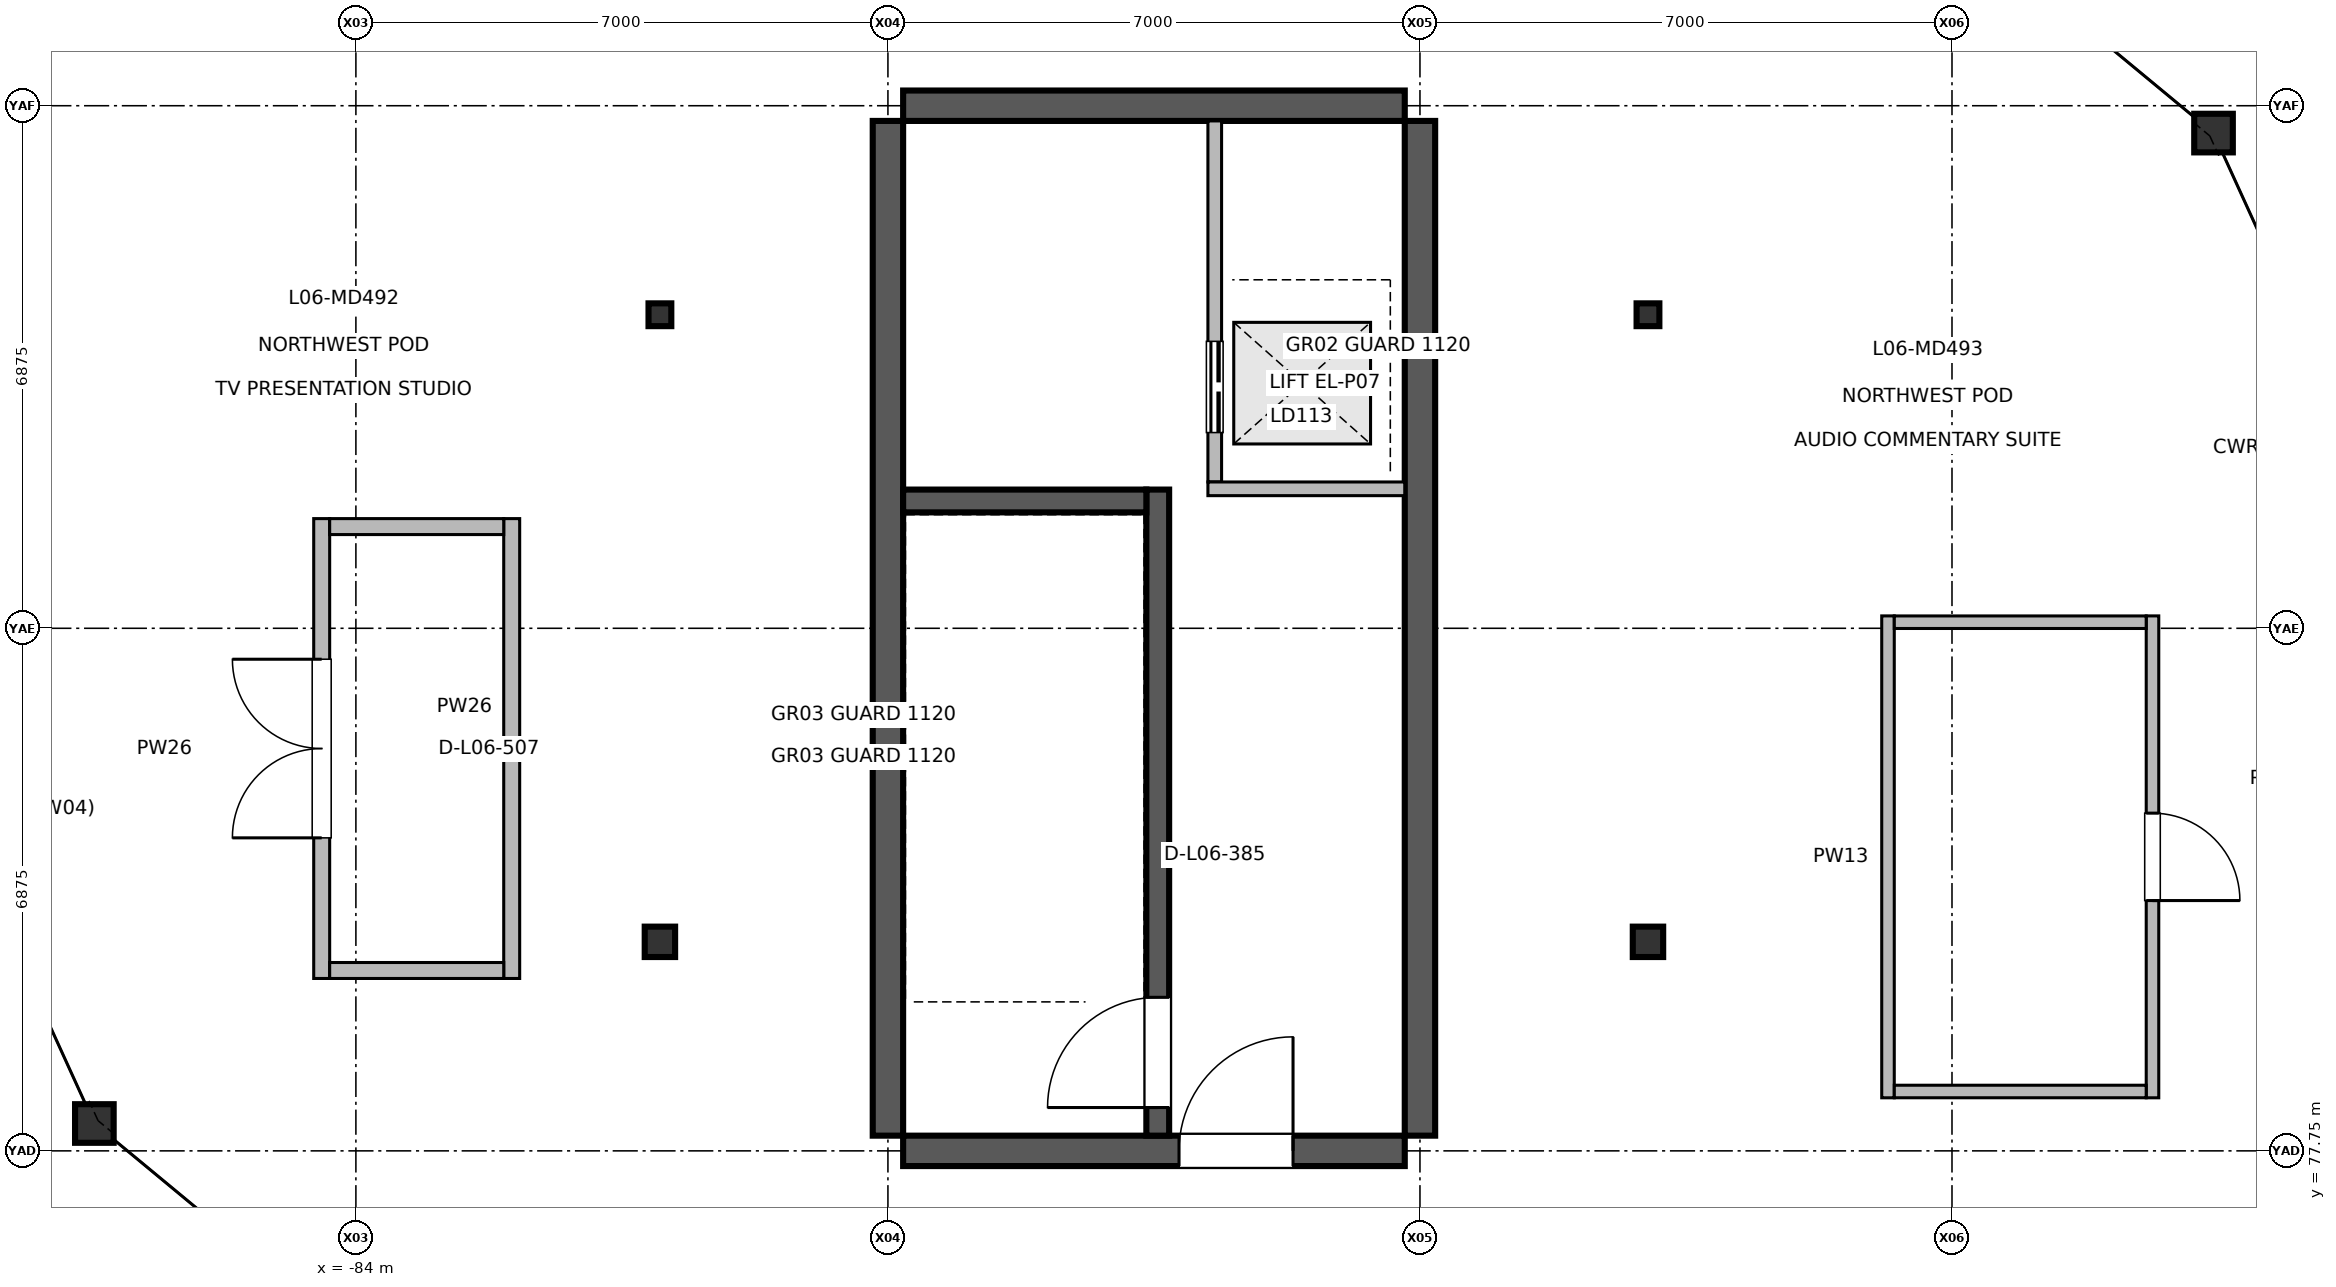
"""IFC4 building model, lengths in metres.
Left out: names, types, materials, properties, quantities, classifications, styles, units other than length and angle.
Written with IfcOpenShell. Run it as: python <this file> out.ifc"""

import sys

from ifc_helpers import new_model, si_unit, direction, frame, frame_2d, origin, origin_2d, place, context, subcontext, project, spatial, rectangle, hollow_circle, i_section, extrude, element, fill, save


model = new_model("IFC4")
c1 = context("Model", 3, precision=1e-05, world=origin(), true_north=direction((0.0, 1.0)))
c2 = subcontext(c1, "Body", "Model", "MODEL_VIEW")
j1 = project(units=[si_unit("LENGTHUNIT", "METRE"), si_unit("PLANEANGLEUNIT", "RADIAN")], contexts=[c1])
p1 = place(None, origin())
s1 = spatial("IfcSite", under=j1, at=p1, CompositionType="ELEMENT")
p2 = place(p1, origin())
s2 = spatial("IfcBuilding", under=s1, at=p2, CompositionType="ELEMENT")
p3 = place(p2, frame((0.0, 0.0, 26.4)))
s3 = spatial("IfcBuildingStorey", under=s2, at=p3, CompositionType="ELEMENT", Elevation=26.4)
for number, where, z_axis, x_axis in (
    (1, (-80.0, 80.5, 0.0), (0.0, 0.0, 1.0), (1.0, 0.0, 0.0)),
    (2, (-67.0, 80.5, 0.0), (0.0, 0.0, 1.0), (1.0, 0.0, 0.0)),
):
    element("IfcColumn", number, at=place(p3, frame(where, z_axis=z_axis, x_axis=x_axis)), inside=s3, PredefinedType="COLUMN", context=c2, shape_type="SweptSolid", body=[
        extrude(i_section(OverallWidth=0.4, OverallDepth=0.4, WebThickness=0.013, FlangeThickness=0.021, at=origin_2d()), origin(), (0.0, 0.0, 1.0), 4.945),
    ])
for number, where, z_axis, x_axis in (
    (3, (-80.0, 88.75, 0.0), (0.0, 0.0, 1.0), (1.0, 0.0, 0.0)),
    (4, (-67.0, 88.75, 0.0), (0.0, 0.0, 1.0), (1.0, 0.0, 0.0)),
):
    element("IfcColumn", number, at=place(p3, frame(where, z_axis=z_axis, x_axis=x_axis)), inside=s3, PredefinedType="COLUMN", context=c2, shape_type="SweptSolid", body=[
        extrude(i_section(OverallWidth=0.3, OverallDepth=0.3, WebThickness=0.01, FlangeThickness=0.015, at=origin_2d()), origin(), (0.0, 0.0, 1.0), 4.945),
    ])
for number, where, z_axis, x_axis in (
    (5, (-59.559, 91.14, 0.0), (0.0, 0.0, 1.0), (1.0, 0.0, 0.0)),
    (6, (-87.441, 78.11, 0.0), (0.0, 0.0, 1.0), (1.0, 0.0, 0.0)),
):
    element("IfcColumn", number, at=place(p3, frame(where, z_axis=z_axis, x_axis=x_axis)), inside=s3, PredefinedType="COLUMN", context=c2, shape_type="SweptSolid", body=[
        extrude(hollow_circle(Radius=0.254, WallThickness=0.025, at=origin_2d()), origin(), (0.0, 0.0, 1.0), 4.945),
    ])
for number, where, z_axis, x_axis in (
    (7, (-77.0, 77.95, 0.0), (0.0, 0.0, 1.0), (0.0, 1.0, 0.0)),
    (8, (-70.0, 77.95, 0.0), (0.0, 0.0, 1.0), (0.0, 1.0, 0.0)),
):
    element("IfcWall", number, at=place(p3, frame(where, z_axis=z_axis, x_axis=x_axis)), inside=s3, PredefinedType="SHEAR", context=c2, shape_type="SweptSolid", body=[
        extrude(rectangle(XDim=13.35, YDim=0.4, at=frame_2d((6.675, 0.0))), origin(), (0.0, 0.0, 1.0), 4.945),
    ])
p4 = place(p3, frame((-76.8, 77.75, 0.0), z_axis=(0.0, 0.0, 1.0), x_axis=(1.0, 0.0, 0.0)))
e9 = element("IfcWall", 9, at=p4, inside=s3, PredefinedType="SHEAR", context=c2, shape_type="SweptSolid", body=[
    extrude(rectangle(XDim=6.6, YDim=0.4, at=frame_2d((3.3, 0.0))), origin(), (0.0, 0.0, 1.0), 4.945),
])
p5 = place(p4, frame((3.63, 0.0, 0.0)))
e10 = element("IfcOpeningElement", 10, at=p5, cuts=e9, PredefinedType="OPENING", context=c2, shape_type="SweptSolid", body=[
    extrude(rectangle(XDim=1.5, YDim=2.2, at=frame_2d((0.75, 1.1))), frame((0.0, 0.21, 0.0), z_axis=(0.0, -1.0, 0.0), x_axis=(1.0, 0.0, 0.0)), (0.0, 0.0, 1.0), 0.42),
])
p6 = place(p3, frame((-76.8, 91.5, 0.0), z_axis=(0.0, 0.0, 1.0), x_axis=(1.0, 0.0, 0.0)))
e11 = element("IfcWall", 11, at=p6, inside=s3, PredefinedType="SHEAR", context=c2, shape_type="SweptSolid", body=[
    extrude(rectangle(XDim=6.6, YDim=0.4, at=frame_2d((3.3, 0.0))), origin(), (0.0, 0.0, 1.0), 4.945),
])
p7 = place(p3, frame((-73.45, 77.95, 0.0), z_axis=(0.0, 0.0, 1.0), x_axis=(0.0, 1.0, 0.0)))
e12 = element("IfcWall", 12, at=p7, inside=s3, PredefinedType="SHEAR", context=c2, shape_type="SweptSolid", body=[
    extrude(rectangle(XDim=8.5, YDim=0.3, at=frame_2d((4.25, 0.0))), origin(), (0.0, 0.0, 1.0), 4.945),
])
p8 = place(p7, frame((0.37, 0.0, 0.0)))
e13 = element("IfcOpeningElement", 13, at=p8, cuts=e12, PredefinedType="OPENING", context=c2, shape_type="SweptSolid", body=[
    extrude(rectangle(XDim=1.45, YDim=2.2, at=frame_2d((0.725, 1.1))), frame((0.0, 0.16, 0.0), z_axis=(0.0, -1.0, 0.0), x_axis=(1.0, 0.0, 0.0)), (0.0, 0.0, 1.0), 0.32),
])
p9 = place(p3, frame((-72.7, 86.55, 0.0), z_axis=(0.0, 0.0, 1.0), x_axis=(0.0, 1.0, 0.0)))
e14 = element("IfcWall", 14, at=p9, inside=s3, PredefinedType="PARTITIONING", context=c2, shape_type="SweptSolid", body=[
    extrude(rectangle(XDim=4.75, YDim=0.18, at=frame_2d((2.375, 0.0))), origin(), (0.0, 0.0, 1.0), 3.32),
])
p10 = place(p9, frame((0.65, 0.0, 0.0)))
e15 = element("IfcOpeningElement", 15, at=p10, cuts=e14, PredefinedType="OPENING", context=c2, shape_type="SweptSolid", body=[
    extrude(rectangle(XDim=1.2, YDim=2.25, at=frame_2d((0.6, 1.125))), frame((0.0, 0.1, 0.0), z_axis=(0.0, -1.0, 0.0), x_axis=(1.0, 0.0, 0.0)), (0.0, 0.0, 1.0), 0.2),
])
p11 = place(p3, frame((-84.45, 80.018, 0.0), z_axis=(0.0, 0.0, 1.0), x_axis=(0.0, 1.0, 0.0)))
e16 = element("IfcWall", 16, at=p11, inside=s3, PredefinedType="PARTITIONING", context=c2, shape_type="SweptSolid", body=[
    extrude(rectangle(XDim=6.05, YDim=0.21, at=frame_2d((3.025, 0.0))), origin(), (0.0, 0.0, 1.0), 4.22),
])
p12 = place(p11, frame((1.85, 0.0, 0.0)))
e17 = element("IfcOpeningElement", 17, at=p12, cuts=e16, PredefinedType="OPENING", context=c2, shape_type="SweptSolid", body=[
    extrude(rectangle(XDim=2.35, YDim=2.5, at=frame_2d((1.175, 1.25))), frame((0.0, 0.115, 0.0), z_axis=(0.0, -1.0, 0.0), x_axis=(1.0, 0.0, 0.0)), (0.0, 0.0, 1.0), 0.23),
])
p13 = place(p3, frame((-60.362, 84.788, 0.0), z_axis=(0.0, 0.0, 1.0), x_axis=(0.0, -1.0, 0.0)))
e18 = element("IfcWall", 18, at=p13, inside=s3, PredefinedType="PARTITIONING", context=c2, shape_type="SweptSolid", body=[
    extrude(rectangle(XDim=6.34, YDim=0.165, at=frame_2d((3.17, 0.0))), origin(), (0.0, 0.0, 1.0), 4.22),
])
p14 = place(p13, frame((2.595, 0.0, 0.0)))
e19 = element("IfcOpeningElement", 19, at=p14, cuts=e18, PredefinedType="OPENING", context=c2, shape_type="SweptSolid", body=[
    extrude(rectangle(XDim=1.15, YDim=2.2, at=frame_2d((0.575, 1.1))), frame((0.0, 0.093, 0.0), z_axis=(0.0, -1.0, 0.0), x_axis=(1.0, 0.0, 0.0)), (0.0, 0.0, 1.0), 0.185),
])
p15 = place(p3, frame((-72.79, 86.46, 0.0), z_axis=(0.0, 0.0, 1.0), x_axis=(1.0, 0.0, 0.0)))
e20 = element("IfcWall", 20, at=p15, inside=s3, PredefinedType="PARTITIONING", context=c2, shape_type="SweptSolid", body=[
    extrude(rectangle(XDim=2.59, YDim=0.18, at=frame_2d((1.295, 0.0))), origin(), (0.0, 0.0, 1.0), 4.22),
])
p16 = place(p3, frame((-81.95, 80.018, 0.0), z_axis=(0.0, 0.0, 1.0), x_axis=(0.0, 1.0, 0.0)))
e21 = element("IfcWall", 21, at=p16, inside=s3, PredefinedType="PARTITIONING", context=c2, shape_type="SweptSolid", body=[
    extrude(rectangle(XDim=6.05, YDim=0.21, at=frame_2d((3.025, 0.0))), origin(), (0.0, 0.0, 1.0), 4.22),
])
for number, where, z_axis, x_axis in (
    (22, (-84.345, 80.123, 0.0), (0.0, 0.0, 1.0), (1.0, 0.0, 0.0)),
    (23, (-84.345, 85.963, 0.0), (0.0, 0.0, 1.0), (1.0, 0.0, 0.0)),
):
    element("IfcWall", number, at=place(p3, frame(where, z_axis=z_axis, x_axis=x_axis)), inside=s3, PredefinedType="PARTITIONING", context=c2, shape_type="SweptSolid", body=[
        extrude(rectangle(XDim=2.29, YDim=0.21, at=frame_2d((1.145, 0.0))), origin(), (0.0, 0.0, 1.0), 4.22),
    ])
p17 = place(p3, frame((-63.842, 78.448, 0.0), z_axis=(0.0, 0.0, 1.0), x_axis=(0.0, 1.0, 0.0)))
e24 = element("IfcWall", 24, at=p17, inside=s3, PredefinedType="PARTITIONING", context=c2, shape_type="SweptSolid", body=[
    extrude(rectangle(XDim=6.34, YDim=0.165, at=frame_2d((3.17, 0.0))), origin(), (0.0, 0.0, 1.0), 4.22),
])
for number, where, z_axis, x_axis in (
    (25, (-63.759, 78.531, 0.0), (0.0, 0.0, 1.0), (1.0, 0.0, 0.0)),
    (26, (-63.759, 84.705, 0.0), (0.0, 0.0, 1.0), (1.0, 0.0, 0.0)),
):
    element("IfcWall", number, at=place(p3, frame(where, z_axis=z_axis, x_axis=x_axis)), inside=s3, PredefinedType="PARTITIONING", context=c2, shape_type="SweptSolid", body=[
        extrude(rectangle(XDim=3.314, YDim=0.165, at=frame_2d((1.657, 0.0))), origin(), (0.0, 0.0, 1.0), 4.22),
    ])
p18 = place(p3, frame((-76.8, 86.3, 0.0), z_axis=(0.0, 0.0, 1.0), x_axis=(1.0, 0.0, 0.0)))
e27 = element("IfcWall", 27, at=p18, inside=s3, PredefinedType="SHEAR", context=c2, shape_type="SweptSolid", body=[
    extrude(rectangle(XDim=3.2, YDim=0.3, at=frame_2d((1.6, 0.0))), origin(), (0.0, 0.0, 1.0), 4.945),
])
p19 = place(p5, origin())
e28 = element("IfcDoor", 28, at=p19, inside=s3, OperationType="SINGLE_SWING_RIGHT", PredefinedType="DOOR", context=c2, shape_type="SweptSolid", body=[
    extrude(rectangle(XDim=1.5, YDim=2.2, at=frame_2d((0.75, 1.1))), frame((0.0, 0.025, 0.0), z_axis=(0.0, -1.0, 0.0), x_axis=(1.0, 0.0, 0.0)), (0.0, 0.0, 1.0), 0.05),
])
fill(e10, e28)
p20 = place(p8, origin())
e29 = element("IfcDoor", 29, at=p20, inside=s3, OperationType="SINGLE_SWING_LEFT", PredefinedType="DOOR", context=c2, shape_type="SweptSolid", body=[
    extrude(rectangle(XDim=1.45, YDim=2.2, at=frame_2d((0.725, 1.1))), frame((0.0, 0.025, 0.0), z_axis=(0.0, -1.0, 0.0), x_axis=(1.0, 0.0, 0.0)), (0.0, 0.0, 1.0), 0.05),
])
fill(e13, e29)
p21 = place(p10, origin())
e30 = element("IfcDoor", 30, at=p21, inside=s3, OperationType="DOUBLE_DOOR_SLIDING", PredefinedType="DOOR", context=c2, shape_type="SweptSolid", body=[
    extrude(rectangle(XDim=1.2, YDim=2.25, at=frame_2d((0.6, 1.125))), frame((0.0, 0.025, 0.0), z_axis=(0.0, -1.0, 0.0), x_axis=(1.0, 0.0, 0.0)), (0.0, 0.0, 1.0), 0.05),
])
fill(e15, e30)
p22 = place(p12, origin())
e31 = element("IfcDoor", 31, at=p22, inside=s3, OperationType="DOUBLE_DOOR_SINGLE_SWING", PredefinedType="DOOR", context=c2, shape_type="SweptSolid", body=[
    extrude(rectangle(XDim=2.35, YDim=2.5, at=frame_2d((1.175, 1.25))), frame((0.0, 0.025, 0.0), z_axis=(0.0, -1.0, 0.0), x_axis=(1.0, 0.0, 0.0)), (0.0, 0.0, 1.0), 0.05),
])
fill(e17, e31)
p23 = place(p14, origin())
e32 = element("IfcDoor", 32, at=p23, inside=s3, OperationType="SINGLE_SWING_RIGHT", PredefinedType="DOOR", context=c2, shape_type="SweptSolid", body=[
    extrude(rectangle(XDim=1.15, YDim=2.2, at=frame_2d((0.575, 1.1))), frame((0.0, 0.025, 0.0), z_axis=(0.0, -1.0, 0.0), x_axis=(1.0, 0.0, 0.0)), (0.0, 0.0, 1.0), 0.05),
])
fill(e19, e32)
save(model, sys.argv[1])
